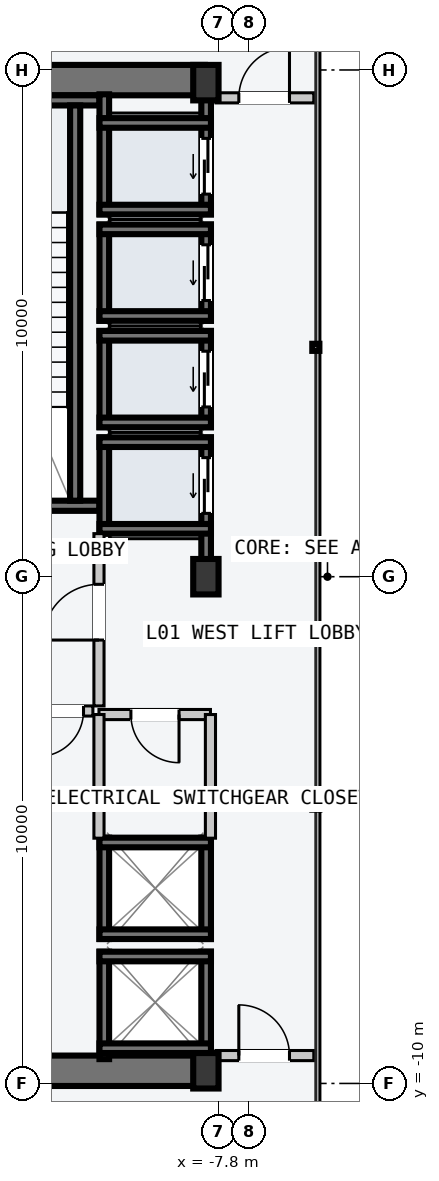
"""IFC4 building model, lengths in metres.
Left out: names, types, materials, properties, quantities, classifications, styles, units other than length and angle.
Written with IfcOpenShell. Run it as: python <this file> out.ifc"""

import sys

from ifc_helpers import new_model, si_unit, direction, frame, frame_2d, origin, origin_2d, place, context, subcontext, project, spatial, rectangle, i_section, extrude, element, fill, save


model = new_model("IFC4")
c1 = context("Model", 3, precision=1e-05, world=origin(), true_north=direction((0.0, 1.0)))
c2 = subcontext(c1, "Body", "Model", "MODEL_VIEW")
j1 = project(units=[si_unit("LENGTHUNIT", "METRE"), si_unit("PLANEANGLEUNIT", "RADIAN")], contexts=[c1])
p1 = place(None, origin())
s1 = spatial("IfcSite", under=j1, at=p1, CompositionType="ELEMENT")
p2 = place(p1, origin())
s2 = spatial("IfcBuilding", under=s1, at=p2, CompositionType="ELEMENT")
p3 = place(p2, frame((0.0, 0.0, 4.8)))
s3 = spatial("IfcBuildingStorey", under=s2, at=p3, CompositionType="ELEMENT", Elevation=4.8)
for number, where, z_axis, x_axis in (
    (1, (-14.53, -9.75, -0.22), (0.0, 0.0, 1.0), (1.0, 0.0, 0.0)),
    (2, (-14.53, 9.8, -0.22), (0.0, 0.0, 1.0), (1.0, 0.0, 0.0)),
):
    element("IfcWall", number, at=place(p3, frame(where, z_axis=z_axis, x_axis=x_axis)), inside=s3, PredefinedType="SHEAR", context=c2, shape_type="SweptSolid", body=[
        extrude(rectangle(XDim=6.46, YDim=0.6, at=frame_2d((3.23, 0.0))), origin(), (0.0, 0.0, 1.0), 4.8),
    ])
p4 = place(p3, frame((-14.25, 1.4, -0.22), z_axis=(0.0, 0.0, 1.0), x_axis=(1.0, 0.0, 0.0)))
e3 = element("IfcWall", 3, at=p4, inside=s3, PredefinedType="SOLIDWALL", context=c2, shape_type="SweptSolid", body=[
    extrude(rectangle(XDim=4.1, YDim=0.2, at=frame_2d((2.05, 0.0))), origin(), (0.0, 0.0, 1.0), 4.8),
])
p5 = place(p4, frame((1.5, 0.0, 0.22)))
e4 = element("IfcOpeningElement", 4, at=p5, cuts=e3, PredefinedType="OPENING", context=c2, shape_type="SweptSolid", body=[
    extrude(rectangle(XDim=1.12, YDim=2.18, at=frame_2d((0.56, 1.09))), frame((0.0, 0.11, 0.0), z_axis=(0.0, -1.0, 0.0), x_axis=(1.0, 0.0, 0.0)), (0.0, 0.0, 1.0), 0.22),
])
p6 = place(p3, frame((-14.25, 9.4, -0.22), z_axis=(0.0, 0.0, 1.0), x_axis=(1.0, 0.0, 0.0)))
e5 = element("IfcWall", 5, at=p6, inside=s3, PredefinedType="SOLIDWALL", context=c2, shape_type="SweptSolid", body=[
    extrude(rectangle(XDim=4.1, YDim=0.2, at=frame_2d((2.05, 0.0))), origin(), (0.0, 0.0, 1.0), 4.8),
])
p7 = place(p3, frame((-10.63, 1.5, -0.22), z_axis=(0.0, 0.0, 1.0), x_axis=(0.0, 1.0, 0.0)))
e6 = element("IfcWall", 6, at=p7, inside=s3, PredefinedType="SOLIDWALL", context=c2, shape_type="SweptSolid", body=[
    extrude(rectangle(XDim=7.8, YDim=0.2, at=frame_2d((3.9, 0.0))), origin(), (0.0, 0.0, 1.0), 4.8),
])
for number, where, z_axis, x_axis in (
    (7, (-8.05, -9.75, 0.0), (0.0, 0.0, 1.0), (1.0, 0.0, 0.0)),
    (8, (-8.05, 0.0, 0.0), (0.0, 0.0, 1.0), (1.0, 0.0, 0.0)),
    (9, (-8.05, 9.75, 0.0), (0.0, 0.0, 1.0), (1.0, 0.0, 0.0)),
):
    element("IfcColumn", number, at=place(p3, frame(where, z_axis=z_axis, x_axis=x_axis)), inside=s3, PredefinedType="COLUMN", context=c2, shape_type="SweptSolid", body=[
        extrude(i_section(OverallWidth=0.5, OverallDepth=0.7, WebThickness=0.028, FlangeThickness=0.045, at=origin_2d()), origin(), (0.0, 0.0, 1.0), 4.8),
    ])
p8 = place(p3, frame((-8.045, 0.21, -0.22), z_axis=(0.0, 0.0, 1.0), x_axis=(0.0, 1.0, 0.0)))
e10 = element("IfcWall", 10, at=p8, inside=s3, PredefinedType="SOLIDWALL", context=c2, shape_type="SweptSolid", body=[
    extrude(rectangle(XDim=2.54, YDim=0.19, at=frame_2d((1.27, 0.0))), origin(), (0.0, 0.0, 1.0), 4.8),
])
p9 = place(p8, frame((1.04, 0.0, 0.22)))
e11 = element("IfcOpeningElement", 11, at=p9, cuts=e10, PredefinedType="OPENING", context=c2, shape_type="SweptSolid", body=[
    extrude(rectangle(XDim=1.1, YDim=2.2, at=frame_2d((0.55, 1.1))), frame((0.0, 0.105, 0.0), z_axis=(0.0, -1.0, 0.0), x_axis=(1.0, 0.0, 0.0)), (0.0, 0.0, 1.0), 0.21),
])
p10 = place(p3, frame((-10.055, 0.85, -0.22), z_axis=(0.0, 0.0, 1.0), x_axis=(0.0, 1.0, 0.0)))
e12 = element("IfcWall", 12, at=p10, inside=s3, PredefinedType="SOLIDWALL", context=c2, shape_type="SweptSolid", body=[
    extrude(rectangle(XDim=1.9, YDim=0.19, at=frame_2d((0.95, 0.0))), origin(), (0.0, 0.0, 1.0), 4.8),
])
for number, where, z_axis, x_axis in (
    (13, (-10.15, 2.655, -0.22), (0.0, 0.0, 1.0), (1.0, 0.0, 0.0)),
    (14, (-10.15, 0.945, -0.22), (0.0, 0.0, 1.0), (1.0, 0.0, 0.0)),
):
    element("IfcWall", number, at=place(p3, frame(where, z_axis=z_axis, x_axis=x_axis)), inside=s3, PredefinedType="SOLIDWALL", context=c2, shape_type="SweptSolid", body=[
        extrude(rectangle(XDim=2.2, YDim=0.19, at=frame_2d((1.1, 0.0))), origin(), (0.0, 0.0, 1.0), 4.8),
    ])
p11 = place(p3, frame((-8.045, 2.95, -0.22), z_axis=(0.0, 0.0, 1.0), x_axis=(0.0, 1.0, 0.0)))
e15 = element("IfcWall", 15, at=p11, inside=s3, PredefinedType="SOLIDWALL", context=c2, shape_type="SweptSolid", body=[
    extrude(rectangle(XDim=1.9, YDim=0.19, at=frame_2d((0.95, 0.0))), origin(), (0.0, 0.0, 1.0), 4.8),
])
p12 = place(p11, frame((0.4, 0.0, 0.22)))
e16 = element("IfcOpeningElement", 16, at=p12, cuts=e15, PredefinedType="OPENING", context=c2, shape_type="SweptSolid", body=[
    extrude(rectangle(XDim=1.1, YDim=2.2, at=frame_2d((0.55, 1.1))), frame((0.0, 0.105, 0.0), z_axis=(0.0, -1.0, 0.0), x_axis=(1.0, 0.0, 0.0)), (0.0, 0.0, 1.0), 0.21),
])
p13 = place(p3, frame((-10.055, 2.95, -0.22), z_axis=(0.0, 0.0, 1.0), x_axis=(0.0, 1.0, 0.0)))
e17 = element("IfcWall", 17, at=p13, inside=s3, PredefinedType="SOLIDWALL", context=c2, shape_type="SweptSolid", body=[
    extrude(rectangle(XDim=1.9, YDim=0.19, at=frame_2d((0.95, 0.0))), origin(), (0.0, 0.0, 1.0), 4.8),
])
for number, where, z_axis, x_axis in (
    (18, (-10.15, 4.755, -0.22), (0.0, 0.0, 1.0), (1.0, 0.0, 0.0)),
    (19, (-10.15, 3.045, -0.22), (0.0, 0.0, 1.0), (1.0, 0.0, 0.0)),
):
    element("IfcWall", number, at=place(p3, frame(where, z_axis=z_axis, x_axis=x_axis)), inside=s3, PredefinedType="SOLIDWALL", context=c2, shape_type="SweptSolid", body=[
        extrude(rectangle(XDim=2.2, YDim=0.19, at=frame_2d((1.1, 0.0))), origin(), (0.0, 0.0, 1.0), 4.8),
    ])
p14 = place(p3, frame((-8.045, 5.05, -0.22), z_axis=(0.0, 0.0, 1.0), x_axis=(0.0, 1.0, 0.0)))
e20 = element("IfcWall", 20, at=p14, inside=s3, PredefinedType="SOLIDWALL", context=c2, shape_type="SweptSolid", body=[
    extrude(rectangle(XDim=1.9, YDim=0.19, at=frame_2d((0.95, 0.0))), origin(), (0.0, 0.0, 1.0), 4.8),
])
p15 = place(p14, frame((0.4, 0.0, 0.22)))
e21 = element("IfcOpeningElement", 21, at=p15, cuts=e20, PredefinedType="OPENING", context=c2, shape_type="SweptSolid", body=[
    extrude(rectangle(XDim=1.1, YDim=2.2, at=frame_2d((0.55, 1.1))), frame((0.0, 0.105, 0.0), z_axis=(0.0, -1.0, 0.0), x_axis=(1.0, 0.0, 0.0)), (0.0, 0.0, 1.0), 0.21),
])
p16 = place(p3, frame((-10.055, 5.05, -0.22), z_axis=(0.0, 0.0, 1.0), x_axis=(0.0, 1.0, 0.0)))
e22 = element("IfcWall", 22, at=p16, inside=s3, PredefinedType="SOLIDWALL", context=c2, shape_type="SweptSolid", body=[
    extrude(rectangle(XDim=1.9, YDim=0.19, at=frame_2d((0.95, 0.0))), origin(), (0.0, 0.0, 1.0), 4.8),
])
for number, where, z_axis, x_axis in (
    (23, (-10.15, 6.855, -0.22), (0.0, 0.0, 1.0), (1.0, 0.0, 0.0)),
    (24, (-10.15, 5.145, -0.22), (0.0, 0.0, 1.0), (1.0, 0.0, 0.0)),
):
    element("IfcWall", number, at=place(p3, frame(where, z_axis=z_axis, x_axis=x_axis)), inside=s3, PredefinedType="SOLIDWALL", context=c2, shape_type="SweptSolid", body=[
        extrude(rectangle(XDim=2.2, YDim=0.19, at=frame_2d((1.1, 0.0))), origin(), (0.0, 0.0, 1.0), 4.8),
    ])
p17 = place(p3, frame((-8.045, 7.15, -0.22), z_axis=(0.0, 0.0, 1.0), x_axis=(0.0, 1.0, 0.0)))
e25 = element("IfcWall", 25, at=p17, inside=s3, PredefinedType="SOLIDWALL", context=c2, shape_type="SweptSolid", body=[
    extrude(rectangle(XDim=2.37, YDim=0.19, at=frame_2d((1.185, 0.0))), origin(), (0.0, 0.0, 1.0), 4.8),
])
p18 = place(p17, frame((0.4, 0.0, 0.22)))
e26 = element("IfcOpeningElement", 26, at=p18, cuts=e25, PredefinedType="OPENING", context=c2, shape_type="SweptSolid", body=[
    extrude(rectangle(XDim=1.1, YDim=2.2, at=frame_2d((0.55, 1.1))), frame((0.0, 0.105, 0.0), z_axis=(0.0, -1.0, 0.0), x_axis=(1.0, 0.0, 0.0)), (0.0, 0.0, 1.0), 0.21),
])
p19 = place(p3, frame((-10.055, 7.15, -0.22), z_axis=(0.0, 0.0, 1.0), x_axis=(0.0, 1.0, 0.0)))
e27 = element("IfcWall", 27, at=p19, inside=s3, PredefinedType="SOLIDWALL", context=c2, shape_type="SweptSolid", body=[
    extrude(rectangle(XDim=2.37, YDim=0.19, at=frame_2d((1.185, 0.0))), origin(), (0.0, 0.0, 1.0), 4.8),
])
for number, where, z_axis, x_axis in (
    (28, (-10.15, 8.955, -0.22), (0.0, 0.0, 1.0), (1.0, 0.0, 0.0)),
    (29, (-10.15, 7.245, -0.22), (0.0, 0.0, 1.0), (1.0, 0.0, 0.0)),
):
    element("IfcWall", number, at=place(p3, frame(where, z_axis=z_axis, x_axis=x_axis)), inside=s3, PredefinedType="SOLIDWALL", context=c2, shape_type="SweptSolid", body=[
        extrude(rectangle(XDim=2.2, YDim=0.19, at=frame_2d((1.1, 0.0))), origin(), (0.0, 0.0, 1.0), 4.8),
    ])
for number, where, z_axis, x_axis in (
    (30, (-8.045, -9.52, -0.22), (0.0, 0.0, 1.0), (0.0, 1.0, 0.0)),
    (31, (-10.055, -9.52, -0.22), (0.0, 0.0, 1.0), (0.0, 1.0, 0.0)),
):
    element("IfcWall", number, at=place(p3, frame(where, z_axis=z_axis, x_axis=x_axis)), inside=s3, PredefinedType="SOLIDWALL", context=c2, shape_type="SweptSolid", body=[
        extrude(rectangle(XDim=2.12, YDim=0.19, at=frame_2d((1.06, 0.0))), origin(), (0.0, 0.0, 1.0), 4.8),
    ])
for number, where, z_axis, x_axis in (
    (32, (-10.15, -7.495, -0.22), (0.0, 0.0, 1.0), (1.0, 0.0, 0.0)),
    (33, (-10.15, -9.305, -0.22), (0.0, 0.0, 1.0), (1.0, 0.0, 0.0)),
):
    element("IfcWall", number, at=place(p3, frame(where, z_axis=z_axis, x_axis=x_axis)), inside=s3, PredefinedType="SOLIDWALL", context=c2, shape_type="SweptSolid", body=[
        extrude(rectangle(XDim=2.2, YDim=0.19, at=frame_2d((1.1, 0.0))), origin(), (0.0, 0.0, 1.0), 4.8),
    ])
for number, where, z_axis, x_axis in (
    (34, (-8.045, -7.15, -0.22), (0.0, 0.0, 1.0), (0.0, 1.0, 0.0)),
    (35, (-10.055, -7.15, -0.22), (0.0, 0.0, 1.0), (0.0, 1.0, 0.0)),
):
    element("IfcWall", number, at=place(p3, frame(where, z_axis=z_axis, x_axis=x_axis)), inside=s3, PredefinedType="SOLIDWALL", context=c2, shape_type="SweptSolid", body=[
        extrude(rectangle(XDim=2.0, YDim=0.19, at=frame_2d((1.0, 0.0))), origin(), (0.0, 0.0, 1.0), 4.8),
    ])
for number, where, z_axis, x_axis in (
    (36, (-10.15, -5.245, -0.22), (0.0, 0.0, 1.0), (1.0, 0.0, 0.0)),
    (37, (-10.15, -7.055, -0.22), (0.0, 0.0, 1.0), (1.0, 0.0, 0.0)),
):
    element("IfcWall", number, at=place(p3, frame(where, z_axis=z_axis, x_axis=x_axis)), inside=s3, PredefinedType="SOLIDWALL", context=c2, shape_type="SweptSolid", body=[
        extrude(rectangle(XDim=2.2, YDim=0.19, at=frame_2d((1.1, 0.0))), origin(), (0.0, 0.0, 1.0), 4.8),
    ])
p20 = place(p3, frame((-10.16, -2.55, 0.0), z_axis=(0.0, 0.0, 1.0), x_axis=(0.0, 1.0, 0.0)))
e38 = element("IfcWall", 38, at=p20, inside=s3, PredefinedType="PARTITIONING", context=c2, shape_type="SweptSolid", body=[
    extrude(rectangle(XDim=3.4, YDim=0.2, at=frame_2d((1.7, 0.0))), origin(), (0.0, 0.0, 1.0), 4.58),
])
p21 = place(p20, frame((1.3, 0.0, 0.0)))
e39 = element("IfcOpeningElement", 39, at=p21, cuts=e38, PredefinedType="OPENING", context=c2, shape_type="SweptSolid", body=[
    extrude(rectangle(XDim=1.1, YDim=2.15, at=frame_2d((0.55, 1.075))), frame((0.0, 0.11, 0.0), z_axis=(0.0, -1.0, 0.0), x_axis=(1.0, 0.0, 0.0)), (0.0, 0.0, 1.0), 0.22),
])
p22 = place(p3, frame((-10.28, -2.65, 0.0), z_axis=(0.0, 0.0, 1.0), x_axis=(-1.0, 0.0, 0.0)))
e40 = element("IfcWall", 40, at=p22, inside=s3, PredefinedType="PARTITIONING", context=c2, shape_type="SweptSolid", body=[
    extrude(rectangle(XDim=1.27, YDim=0.2, at=frame_2d((0.635, 0.0))), origin(), (0.0, 0.0, 1.0), 4.58),
])
p23 = place(p22, frame((0.185, 0.0, 0.0)))
e41 = element("IfcOpeningElement", 41, at=p23, cuts=e40, PredefinedType="OPENING", context=c2, shape_type="SweptSolid", body=[
    extrude(rectangle(XDim=0.9, YDim=2.15, at=frame_2d((0.45, 1.075))), frame((0.0, 0.11, 0.0), z_axis=(0.0, -1.0, 0.0), x_axis=(1.0, 0.0, 0.0)), (0.0, 0.0, 1.0), 0.22),
])
p24 = place(p3, frame((-7.96, -2.72, 0.0), z_axis=(0.0, 0.0, 1.0), x_axis=(-1.0, 0.0, 0.0)))
e42 = element("IfcWall", 42, at=p24, inside=s3, PredefinedType="PARTITIONING", context=c2, shape_type="SweptSolid", body=[
    extrude(rectangle(XDim=2.2, YDim=0.2, at=frame_2d((1.1, 0.0))), origin(), (0.0, 0.0, 1.0), 4.58),
])
p25 = place(p24, frame((0.62, 0.0, 0.0)))
e43 = element("IfcOpeningElement", 43, at=p25, cuts=e42, PredefinedType="OPENING", context=c2, shape_type="SweptSolid", body=[
    extrude(rectangle(XDim=0.95, YDim=2.1, at=frame_2d((0.475, 1.05))), frame((0.0, 0.11, 0.0), z_axis=(0.0, -1.0, 0.0), x_axis=(1.0, 0.0, 0.0)), (0.0, 0.0, 1.0), 0.22),
])
for number, where, z_axis, x_axis in (
    (44, (-7.96, -5.16, 0.0), (0.0, 0.0, 1.0), (0.0, 1.0, 0.0)),
    (45, (-10.16, -5.16, 0.0), (0.0, 0.0, 1.0), (0.0, 1.0, 0.0)),
):
    element("IfcWall", number, at=place(p3, frame(where, z_axis=z_axis, x_axis=x_axis)), inside=s3, PredefinedType="PARTITIONING", context=c2, shape_type="SweptSolid", body=[
        extrude(rectangle(XDim=2.44, YDim=0.2, at=frame_2d((1.22, 0.0))), origin(), (0.0, 0.0, 1.0), 4.58),
    ])
p26 = place(p3, frame((-7.85, -9.45, 0.0), z_axis=(0.0, 0.0, 1.0), x_axis=(1.0, 0.0, 0.0)))
e46 = element("IfcWall", 46, at=p26, inside=s3, PredefinedType="PARTITIONING", context=c2, shape_type="SweptSolid", body=[
    extrude(rectangle(XDim=1.93, YDim=0.2, at=frame_2d((0.965, 0.0))), origin(), (0.0, 0.0, 1.0), 4.58),
])
p27 = place(p26, frame((0.45, 0.0, 0.0)))
e47 = element("IfcOpeningElement", 47, at=p27, cuts=e46, PredefinedType="OPENING", context=c2, shape_type="SweptSolid", body=[
    extrude(rectangle(XDim=1.0, YDim=2.15, at=frame_2d((0.5, 1.075))), frame((0.0, 0.11, 0.0), z_axis=(0.0, -1.0, 0.0), x_axis=(1.0, 0.0, 0.0)), (0.0, 0.0, 1.0), 0.22),
])
p28 = place(p3, frame((-7.85, 9.45, 0.0), z_axis=(0.0, 0.0, 1.0), x_axis=(1.0, 0.0, 0.0)))
e48 = element("IfcWall", 48, at=p28, inside=s3, PredefinedType="PARTITIONING", context=c2, shape_type="SweptSolid", body=[
    extrude(rectangle(XDim=1.93, YDim=0.2, at=frame_2d((0.965, 0.0))), origin(), (0.0, 0.0, 1.0), 4.58),
])
p29 = place(p28, frame((0.45, 0.0, 0.0)))
e49 = element("IfcOpeningElement", 49, at=p29, cuts=e48, PredefinedType="OPENING", context=c2, shape_type="SweptSolid", body=[
    extrude(rectangle(XDim=1.0, YDim=2.15, at=frame_2d((0.5, 1.075))), frame((0.0, 0.11, 0.0), z_axis=(0.0, -1.0, 0.0), x_axis=(1.0, 0.0, 0.0)), (0.0, 0.0, 1.0), 0.22),
])
p30 = place(p9, origin())
e50 = element("IfcDoor", 50, at=p30, inside=s3, OperationType="SLIDING_TO_LEFT", PredefinedType="DOOR", context=c2, shape_type="SweptSolid", body=[
    extrude(rectangle(XDim=1.1, YDim=2.2, at=frame_2d((0.55, 1.1))), frame((0.0, 0.025, 0.0), z_axis=(0.0, -1.0, 0.0), x_axis=(1.0, 0.0, 0.0)), (0.0, 0.0, 1.0), 0.05),
])
fill(e11, e50)
p31 = place(p12, origin())
e51 = element("IfcDoor", 51, at=p31, inside=s3, OperationType="SLIDING_TO_LEFT", PredefinedType="DOOR", context=c2, shape_type="SweptSolid", body=[
    extrude(rectangle(XDim=1.1, YDim=2.2, at=frame_2d((0.55, 1.1))), frame((0.0, 0.025, 0.0), z_axis=(0.0, -1.0, 0.0), x_axis=(1.0, 0.0, 0.0)), (0.0, 0.0, 1.0), 0.05),
])
fill(e16, e51)
p32 = place(p15, origin())
e52 = element("IfcDoor", 52, at=p32, inside=s3, OperationType="SLIDING_TO_LEFT", PredefinedType="DOOR", context=c2, shape_type="SweptSolid", body=[
    extrude(rectangle(XDim=1.1, YDim=2.2, at=frame_2d((0.55, 1.1))), frame((0.0, 0.025, 0.0), z_axis=(0.0, -1.0, 0.0), x_axis=(1.0, 0.0, 0.0)), (0.0, 0.0, 1.0), 0.05),
])
fill(e21, e52)
p33 = place(p18, origin())
e53 = element("IfcDoor", 53, at=p33, inside=s3, OperationType="SLIDING_TO_LEFT", PredefinedType="DOOR", context=c2, shape_type="SweptSolid", body=[
    extrude(rectangle(XDim=1.1, YDim=2.2, at=frame_2d((0.55, 1.1))), frame((0.0, 0.025, 0.0), z_axis=(0.0, -1.0, 0.0), x_axis=(1.0, 0.0, 0.0)), (0.0, 0.0, 1.0), 0.05),
])
fill(e26, e53)
p34 = place(p21, origin())
e54 = element("IfcDoor", 54, at=p34, inside=s3, OperationType="SINGLE_SWING_LEFT", PredefinedType="DOOR", context=c2, shape_type="SweptSolid", body=[
    extrude(rectangle(XDim=1.1, YDim=2.15, at=frame_2d((0.55, 1.075))), frame((0.0, 0.025, 0.0), z_axis=(0.0, -1.0, 0.0), x_axis=(1.0, 0.0, 0.0)), (0.0, 0.0, 1.0), 0.05),
])
fill(e39, e54)
p35 = place(p23, origin())
e55 = element("IfcDoor", 55, at=p35, inside=s3, OperationType="SINGLE_SWING_RIGHT", PredefinedType="DOOR", context=c2, shape_type="SweptSolid", body=[
    extrude(rectangle(XDim=0.9, YDim=2.15, at=frame_2d((0.45, 1.075))), frame((0.0, 0.025, 0.0), z_axis=(0.0, -1.0, 0.0), x_axis=(1.0, 0.0, 0.0)), (0.0, 0.0, 1.0), 0.05),
])
fill(e41, e55)
p36 = place(p25, origin())
e56 = element("IfcDoor", 56, at=p36, inside=s3, OperationType="SINGLE_SWING_LEFT", PredefinedType="DOOR", context=c2, shape_type="SweptSolid", body=[
    extrude(rectangle(XDim=0.95, YDim=2.1, at=frame_2d((0.475, 1.05))), frame((0.0, 0.025, 0.0), z_axis=(0.0, -1.0, 0.0), x_axis=(1.0, 0.0, 0.0)), (0.0, 0.0, 1.0), 0.05),
])
fill(e43, e56)
p37 = place(p27, origin())
e57 = element("IfcDoor", 57, at=p37, inside=s3, OperationType="SINGLE_SWING_LEFT", PredefinedType="DOOR", context=c2, shape_type="SweptSolid", body=[
    extrude(rectangle(XDim=1.0, YDim=2.15, at=frame_2d((0.5, 1.075))), frame((0.0, 0.025, 0.0), z_axis=(0.0, -1.0, 0.0), x_axis=(1.0, 0.0, 0.0)), (0.0, 0.0, 1.0), 0.05),
])
fill(e47, e57)
p38 = place(p29, origin())
e58 = element("IfcDoor", 58, at=p38, inside=s3, OperationType="SINGLE_SWING_RIGHT", PredefinedType="DOOR", context=c2, shape_type="SweptSolid", body=[
    extrude(rectangle(XDim=1.0, YDim=2.15, at=frame_2d((0.5, 1.075))), frame((0.0, 0.025, 0.0), z_axis=(0.0, -1.0, 0.0), x_axis=(1.0, 0.0, 0.0)), (0.0, 0.0, 1.0), 0.05),
])
fill(e49, e58)
save(model, sys.argv[1])
